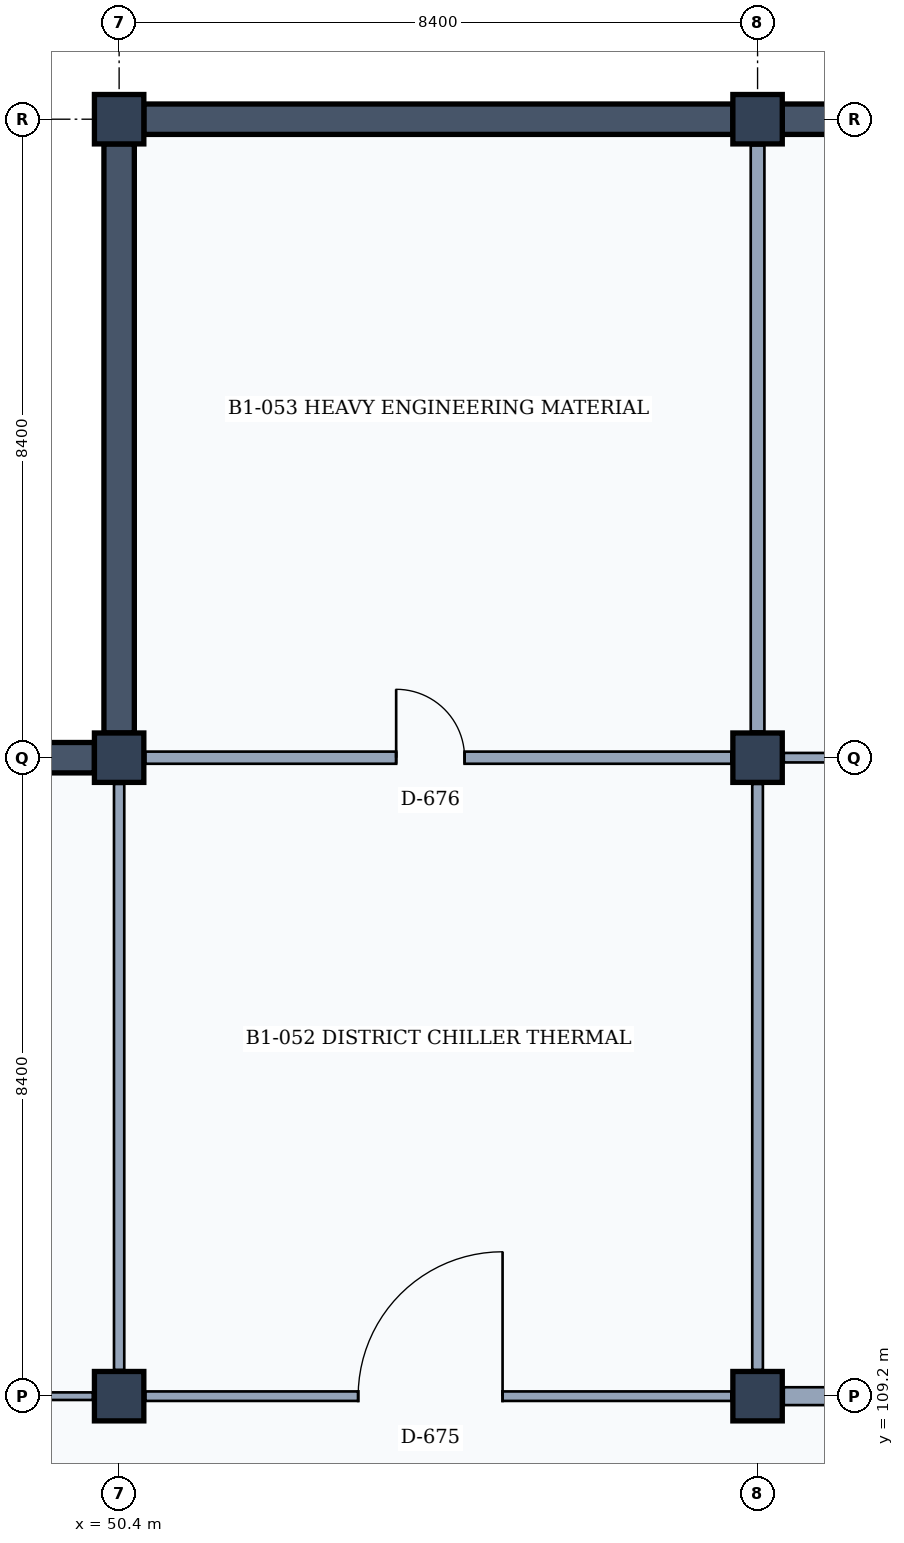
"""IFC4 building model, lengths in metres.
Left out: names, types, materials, properties, quantities, classifications, styles, units other than length and angle.
Written with IfcOpenShell. Run it as: python <this file> out.ifc"""

import sys

from ifc_helpers import new_model, si_unit, direction, frame, frame_2d, origin, origin_2d, place, context, subcontext, project, spatial, rectangle, extrude, element, fill, save


model = new_model("IFC4")
c1 = context("Model", 3, precision=1e-05, world=origin(), true_north=direction((0.0, 1.0)))
c2 = subcontext(c1, "Body", "Model", "MODEL_VIEW")
j1 = project(units=[si_unit("LENGTHUNIT", "METRE"), si_unit("PLANEANGLEUNIT", "RADIAN")], contexts=[c1])
p1 = place(None, origin())
s1 = spatial("IfcSite", under=j1, at=p1, CompositionType="ELEMENT")
p2 = place(p1, origin())
s2 = spatial("IfcBuilding", under=s1, at=p2, CompositionType="ELEMENT")
p3 = place(p2, frame((0.0, 0.0, -4.2)))
s3 = spatial("IfcBuildingStorey", under=s2, at=p3, CompositionType="ELEMENT", Elevation=-4.2)
for number, where, z_axis, x_axis in (
    (1, (50.4, 109.2, 0.0), (0.0, 0.0, 1.0), (1.0, 0.0, 0.0)),
    (2, (50.4, 117.6, 0.0), (0.0, 0.0, 1.0), (1.0, 0.0, 0.0)),
    (3, (50.4, 126.0, 0.0), (0.0, 0.0, 1.0), (1.0, 0.0, 0.0)),
    (4, (58.8, 109.2, 0.0), (0.0, 0.0, 1.0), (1.0, 0.0, 0.0)),
    (5, (58.8, 117.6, 0.0), (0.0, 0.0, 1.0), (1.0, 0.0, 0.0)),
    (6, (58.8, 126.0, 0.0), (0.0, 0.0, 1.0), (1.0, 0.0, 0.0)),
):
    element("IfcColumn", number, at=place(p3, frame(where, z_axis=z_axis, x_axis=x_axis)), inside=s3, PredefinedType="COLUMN", context=c2, shape_type="SweptSolid", body=[
        extrude(rectangle(XDim=0.65, YDim=0.65, at=origin_2d()), origin(), (0.0, 0.0, 1.0), 4.2),
    ])
p4 = place(p3, frame((42.275, 117.6, 0.0), z_axis=(0.0, 0.0, 1.0), x_axis=(1.0, 0.0, 0.0)))
e7 = element("IfcWall", 7, at=p4, inside=s3, PredefinedType="STANDARD", context=c2, shape_type="SweptSolid", body=[
    extrude(rectangle(XDim=7.8, YDim=0.4, at=frame_2d((3.9, 0.0))), origin(), (0.0, 0.0, 1.0), 3.88),
])
for number, where, z_axis, x_axis in (
    (8, (50.725, 126.0, 0.0), (0.0, 0.0, 1.0), (1.0, 0.0, 0.0)),
    (9, (50.4, 117.925, 0.0), (0.0, 0.0, 1.0), (0.0, 1.0, 0.0)),
    (10, (59.125, 126.0, 0.0), (0.0, 0.0, 1.0), (1.0, 0.0, 0.0)),
):
    element("IfcWall", number, at=place(p3, frame(where, z_axis=z_axis, x_axis=x_axis)), inside=s3, PredefinedType="STANDARD", context=c2, shape_type="SweptSolid", body=[
        extrude(rectangle(XDim=7.75, YDim=0.4, at=frame_2d((3.875, 0.0))), origin(), (0.0, 0.0, 1.0), 3.88),
    ])
p5 = place(p3, frame((42.295, 109.2, 0.0), z_axis=(0.0, 0.0, 1.0), x_axis=(1.0, 0.0, 0.0)))
e11 = element("IfcWall", 11, at=p5, inside=s3, PredefinedType="MOVABLE", context=c2, shape_type="SweptSolid", body=[
    extrude(rectangle(XDim=7.76, YDim=0.1, at=frame_2d((3.88, 0.0))), origin(), (0.0, 0.0, 1.0), 3.03),
])
p6 = place(p5, frame((2.925, 0.0, 0.0)))
e12 = element("IfcOpeningElement", 12, at=p6, cuts=e11, PredefinedType="OPENING", context=c2, shape_type="SweptSolid", body=[
    extrude(rectangle(XDim=1.65, YDim=2.25, at=frame_2d((0.825, 1.125))), frame((0.0, 0.06, 0.0), z_axis=(0.0, -1.0, 0.0), x_axis=(1.0, 0.0, 0.0)), (0.0, 0.0, 1.0), 0.12),
])
p7 = place(p3, frame((50.4, 109.545, 0.0), z_axis=(0.0, 0.0, 1.0), x_axis=(0.0, 1.0, 0.0)))
e13 = element("IfcWall", 13, at=p7, inside=s3, PredefinedType="PARTITIONING", context=c2, shape_type="SweptSolid", body=[
    extrude(rectangle(XDim=7.71, YDim=0.135, at=frame_2d((3.855, 0.0))), origin(), (0.0, 0.0, 1.0), 3.23),
])
p8 = place(p3, frame((50.745, 109.2, 0.0), z_axis=(0.0, 0.0, 1.0), x_axis=(1.0, 0.0, 0.0)))
e14 = element("IfcWall", 14, at=p8, inside=s3, PredefinedType="PARTITIONING", context=c2, shape_type="SweptSolid", body=[
    extrude(rectangle(XDim=7.71, YDim=0.125, at=frame_2d((3.855, 0.0))), origin(), (0.0, 0.0, 1.0), 2.93),
])
p9 = place(p8, frame((2.8, 0.0, 0.0)))
e15 = element("IfcOpeningElement", 15, at=p9, cuts=e14, PredefinedType="OPENING", context=c2, shape_type="SweptSolid", body=[
    extrude(rectangle(XDim=1.9, YDim=2.4, at=frame_2d((0.95, 1.2))), frame((0.0, 0.073, 0.0), z_axis=(0.0, -1.0, 0.0), x_axis=(1.0, 0.0, 0.0)), (0.0, 0.0, 1.0), 0.145),
])
p10 = place(p3, frame((58.8, 109.545, 0.0), z_axis=(0.0, 0.0, 1.0), x_axis=(0.0, 1.0, 0.0)))
e16 = element("IfcWall", 16, at=p10, inside=s3, PredefinedType="PARTITIONING", context=c2, shape_type="SweptSolid", body=[
    extrude(rectangle(XDim=7.71, YDim=0.14, at=frame_2d((3.855, 0.0))), origin(), (0.0, 0.0, 1.0), 3.23),
])
p11 = place(p3, frame((50.745, 117.6, 0.0), z_axis=(0.0, 0.0, 1.0), x_axis=(1.0, 0.0, 0.0)))
e17 = element("IfcWall", 17, at=p11, inside=s3, PredefinedType="PARTITIONING", context=c2, shape_type="SweptSolid", body=[
    extrude(rectangle(XDim=7.71, YDim=0.16, at=frame_2d((3.855, 0.0))), origin(), (0.0, 0.0, 1.0), 2.93),
])
p12 = place(p11, frame((3.3, 0.0, 0.0)))
e18 = element("IfcOpeningElement", 18, at=p12, cuts=e17, PredefinedType="OPENING", context=c2, shape_type="SweptSolid", body=[
    extrude(rectangle(XDim=0.9, YDim=2.1, at=frame_2d((0.45, 1.05))), frame((0.0, 0.09, 0.0), z_axis=(0.0, -1.0, 0.0), x_axis=(1.0, 0.0, 0.0)), (0.0, 0.0, 1.0), 0.18),
])
p13 = place(p3, frame((58.8, 117.945, 0.0), z_axis=(0.0, 0.0, 1.0), x_axis=(0.0, 1.0, 0.0)))
e19 = element("IfcWall", 19, at=p13, inside=s3, PredefinedType="PARTITIONING", context=c2, shape_type="SweptSolid", body=[
    extrude(rectangle(XDim=7.71, YDim=0.18, at=frame_2d((3.855, 0.0))), origin(), (0.0, 0.0, 1.0), 3.23),
])
p14 = place(p3, frame((59.145, 109.2, 0.0), z_axis=(0.0, 0.0, 1.0), x_axis=(1.0, 0.0, 0.0)))
e20 = element("IfcWall", 20, at=p14, inside=s3, PredefinedType="PARTITIONING", context=c2, shape_type="SweptSolid", body=[
    extrude(rectangle(XDim=7.71, YDim=0.235, at=frame_2d((3.855, 0.0))), origin(), (0.0, 0.0, 1.0), 2.93),
])
p15 = place(p14, frame((3.05, 0.0, 0.0)))
e21 = element("IfcOpeningElement", 21, at=p15, cuts=e20, PredefinedType="OPENING", context=c2, shape_type="SweptSolid", body=[
    extrude(rectangle(XDim=1.4, YDim=2.25, at=frame_2d((0.7, 1.125))), frame((0.0, 0.127, 0.0), z_axis=(0.0, -1.0, 0.0), x_axis=(1.0, 0.0, 0.0)), (0.0, 0.0, 1.0), 0.255),
])
p16 = place(p3, frame((59.145, 117.6, 0.0), z_axis=(0.0, 0.0, 1.0), x_axis=(1.0, 0.0, 0.0)))
e22 = element("IfcWall", 22, at=p16, inside=s3, PredefinedType="PARTITIONING", context=c2, shape_type="SweptSolid", body=[
    extrude(rectangle(XDim=7.71, YDim=0.125, at=frame_2d((3.855, 0.0))), origin(), (0.0, 0.0, 1.0), 2.93),
])
p17 = place(p16, frame((3.0, 0.0, 0.0)))
e23 = element("IfcOpeningElement", 23, at=p17, cuts=e22, PredefinedType="OPENING", context=c2, shape_type="SweptSolid", body=[
    extrude(rectangle(XDim=1.5, YDim=2.3, at=frame_2d((0.75, 1.15))), frame((0.0, 0.073, 0.0), z_axis=(0.0, -1.0, 0.0), x_axis=(1.0, 0.0, 0.0)), (0.0, 0.0, 1.0), 0.145),
])
p18 = place(p9, origin())
e24 = element("IfcDoor", 24, at=p18, inside=s3, OperationType="SINGLE_SWING_RIGHT", PredefinedType="DOOR", context=c2, shape_type="SweptSolid", body=[
    extrude(rectangle(XDim=1.9, YDim=2.4, at=frame_2d((0.95, 1.2))), frame((0.0, 0.025, 0.0), z_axis=(0.0, -1.0, 0.0), x_axis=(1.0, 0.0, 0.0)), (0.0, 0.0, 1.0), 0.05),
])
fill(e15, e24)
p19 = place(p12, origin())
e25 = element("IfcDoor", 25, at=p19, inside=s3, OperationType="SINGLE_SWING_LEFT", PredefinedType="DOOR", context=c2, shape_type="SweptSolid", body=[
    extrude(rectangle(XDim=0.9, YDim=2.1, at=frame_2d((0.45, 1.05))), frame((0.0, 0.025, 0.0), z_axis=(0.0, -1.0, 0.0), x_axis=(1.0, 0.0, 0.0)), (0.0, 0.0, 1.0), 0.05),
])
fill(e18, e25)
save(model, sys.argv[1])
